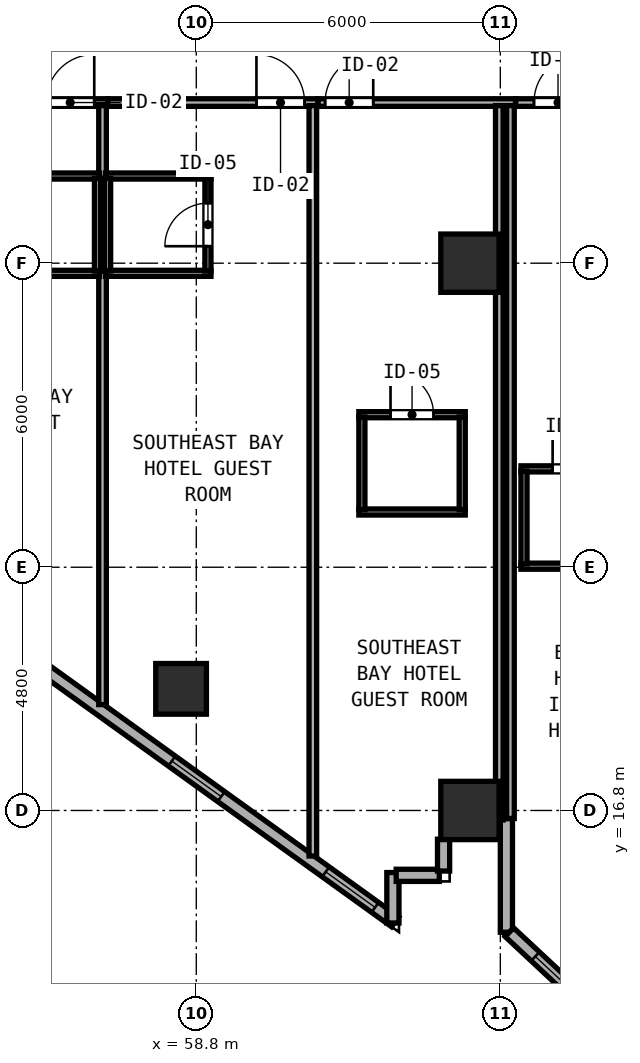
"""IFC4 building model, lengths in metres.
Left out: names, types, materials, properties, quantities, classifications, styles, units other than length and angle.
Written with IfcOpenShell. Run it as: python <this file> out.ifc"""

import sys

from ifc_helpers import new_model, si_unit, direction, frame, frame_2d, origin, origin_2d, place, context, subcontext, project, spatial, rectangle, hollow_rectangle, extrude, element, fill, save


model = new_model("IFC4")
c1 = context("Model", 3, precision=1e-05, world=origin(), true_north=direction((0.0, 1.0)))
c2 = subcontext(c1, "Body", "Model", "MODEL_VIEW")
j1 = project(units=[si_unit("LENGTHUNIT", "METRE"), si_unit("PLANEANGLEUNIT", "RADIAN")], contexts=[c1])
p1 = place(None, origin())
s1 = spatial("IfcSite", under=j1, at=p1, CompositionType="ELEMENT")
p2 = place(p1, origin())
s2 = spatial("IfcBuilding", under=s1, at=p2, CompositionType="ELEMENT")
p3 = place(p2, frame((0.0, 0.0, 81.8)))
s3 = spatial("IfcBuildingStorey", under=s2, at=p3, CompositionType="ELEMENT", Elevation=81.8)
for number, where, z_axis, x_axis in (
    (1, (64.2, 16.8, 0.0), (0.0, 0.0, 1.0), (1.0, 0.0, 0.0)),
    (2, (64.2, 27.6, 0.0), (0.0, 0.0, 1.0), (1.0, 0.0, 0.0)),
):
    element("IfcColumn", number, at=place(p3, frame(where, z_axis=z_axis, x_axis=x_axis)), inside=s3, PredefinedType="COLUMN", context=c2, shape_type="SweptSolid", body=[
        extrude(hollow_rectangle(XDim=1.15, YDim=1.15, WallThickness=0.042, at=origin_2d()), origin(), (0.0, 0.0, 1.0), 3.8),
    ])
p4 = place(p3, frame((58.5, 19.2, 0.0), z_axis=(0.0, 0.0, 1.0), x_axis=(1.0, 0.0, 0.0)))
e3 = element("IfcColumn", 3, at=p4, inside=s3, PredefinedType="COLUMN", context=c2, shape_type="SweptSolid", body=[
    extrude(hollow_rectangle(XDim=1.0, YDim=1.0, WallThickness=0.038, at=origin_2d()), origin(), (0.0, 0.0, 1.0), 3.8),
])
p5 = place(p3, frame((53.367, 21.34, 0.0), z_axis=(0.0, 0.0, 1.0), x_axis=(0.811543176492, -0.58429245476, 0.0)))
e4 = element("IfcWall", 4, at=p5, inside=s3, PredefinedType="SOLIDWALL", context=c2, shape_type="SweptSolid", body=[
    extrude(rectangle(XDim=11.531, YDim=0.24, at=frame_2d((5.765, 0.0))), origin(), (0.0, 0.0, 1.0), 3.097),
])
p6 = place(p5, frame((0.7, 0.0, 0.85)))
e5 = element("IfcOpeningElement", 5, at=p6, cuts=e4, PredefinedType="OPENING", context=c2, shape_type="SweptSolid", body=[
    extrude(rectangle(XDim=1.2, YDim=1.85, at=frame_2d((0.6, 0.925))), frame((0.0, 0.13, 0.0), z_axis=(0.0, -1.0, 0.0), x_axis=(1.0, 0.0, 0.0)), (0.0, 0.0, 1.0), 0.26),
])
p7 = place(p5, frame((6.1, 0.0, 0.85)))
e6 = element("IfcOpeningElement", 6, at=p7, cuts=e4, PredefinedType="OPENING", context=c2, shape_type="SweptSolid", body=[
    extrude(rectangle(XDim=1.2, YDim=1.85, at=frame_2d((0.6, 0.925))), frame((0.0, 0.13, 0.0), z_axis=(0.0, -1.0, 0.0), x_axis=(1.0, 0.0, 0.0)), (0.0, 0.0, 1.0), 0.26),
])
p8 = place(p5, frame((9.842, 0.0, 0.85)))
e7 = element("IfcOpeningElement", 7, at=p8, cuts=e4, PredefinedType="OPENING", context=c2, shape_type="SweptSolid", body=[
    extrude(rectangle(XDim=1.2, YDim=1.85, at=frame_2d((0.6, 0.925))), frame((0.0, 0.13, 0.0), z_axis=(0.0, -1.0, 0.0), x_axis=(1.0, 0.0, 0.0)), (0.0, 0.0, 1.0), 0.26),
])
p9 = place(p3, frame((62.68, 14.579, 0.0), z_axis=(0.0, 0.0, 1.0), x_axis=(0.0, 1.0, 0.0)))
e8 = element("IfcWall", 8, at=p9, inside=s3, PredefinedType="SOLIDWALL", context=c2, shape_type="SweptSolid", body=[
    extrude(rectangle(XDim=0.996, YDim=0.24, at=frame_2d((0.498, 0.0))), origin(), (0.0, 0.0, 1.0), 3.6),
])
p10 = place(p3, frame((62.745, 15.52, 0.0), z_axis=(0.0, 0.0, 1.0), x_axis=(1.0, 0.0, 0.0)))
e9 = element("IfcWall", 9, at=p10, inside=s3, PredefinedType="SOLIDWALL", context=c2, shape_type="SweptSolid", body=[
    extrude(rectangle(XDim=0.85, YDim=0.24, at=frame_2d((0.425, 0.0))), origin(), (0.0, 0.0, 1.0), 3.6),
])
p11 = place(p3, frame((63.68, 15.605, 0.0), z_axis=(0.0, 0.0, 1.0), x_axis=(0.0, 1.0, 0.0)))
e10 = element("IfcWall", 10, at=p11, inside=s3, PredefinedType="SOLIDWALL", context=c2, shape_type="SweptSolid", body=[
    extrude(rectangle(XDim=0.628, YDim=0.24, at=frame_2d((0.314, 0.0))), origin(), (0.0, 0.0, 1.0), 3.6),
])
p12 = place(p3, frame((64.92, 16.64, 0.0), z_axis=(0.0, 0.0, 1.0), x_axis=(0.0, -1.0, 0.0)))
e11 = element("IfcWall", 11, at=p12, inside=s3, PredefinedType="SOLIDWALL", context=c2, shape_type="SweptSolid", body=[
    extrude(rectangle(XDim=2.243, YDim=0.24, at=frame_2d((1.121, 0.0))), origin(), (0.0, 0.0, 1.0), 3.6),
])
p13 = place(p3, frame((64.979, 14.397, 0.0), z_axis=(0.0, 0.0, 1.0), x_axis=(0.731053894258, -0.682319722484, 0.0)))
e12 = element("IfcWall", 12, at=p13, inside=s3, PredefinedType="SOLIDWALL", context=c2, shape_type="SweptSolid", body=[
    extrude(rectangle(XDim=11.818, YDim=0.24, at=frame_2d((5.909, 0.0))), origin(), (0.0, 0.0, 1.0), 3.6),
])
p14 = place(p13, frame((0.7, 0.0, 0.85)))
e13 = element("IfcOpeningElement", 13, at=p14, cuts=e12, PredefinedType="OPENING", context=c2, shape_type="SweptSolid", body=[
    extrude(rectangle(XDim=1.2, YDim=1.85, at=frame_2d((0.6, 0.925))), frame((0.0, 0.13, 0.0), z_axis=(0.0, -1.0, 0.0), x_axis=(1.0, 0.0, 0.0)), (0.0, 0.0, 1.0), 0.26),
])
p15 = place(p13, frame((6.1, 0.0, 0.85)))
e14 = element("IfcOpeningElement", 14, at=p15, cuts=e12, PredefinedType="OPENING", context=c2, shape_type="SweptSolid", body=[
    extrude(rectangle(XDim=1.2, YDim=1.85, at=frame_2d((0.6, 0.925))), frame((0.0, 0.13, 0.0), z_axis=(0.0, -1.0, 0.0), x_axis=(1.0, 0.0, 0.0)), (0.0, 0.0, 1.0), 0.26),
])
p16 = place(p3, frame((73.388, 31.079, 0.0), z_axis=(0.0, 0.0, 1.0), x_axis=(-0.963197271032, 0.268795493036, 0.0)))
e15 = element("IfcWall", 15, at=p16, inside=s3, PredefinedType="SOLIDWALL", context=c2, shape_type="SweptSolid", body=[
    extrude(rectangle(XDim=9.095, YDim=0.24, at=frame_2d((4.548, 0.0))), origin(), (0.0, 0.0, 1.0), 3.6),
])
p17 = place(p16, frame((0.7, 0.0, 0.85)))
e16 = element("IfcOpeningElement", 16, at=p17, cuts=e15, PredefinedType="OPENING", context=c2, shape_type="SweptSolid", body=[
    extrude(rectangle(XDim=1.2, YDim=1.85, at=frame_2d((0.6, 0.925))), frame((0.0, 0.13, 0.0), z_axis=(0.0, -1.0, 0.0), x_axis=(1.0, 0.0, 0.0)), (0.0, 0.0, 1.0), 0.26),
])
p18 = place(p16, frame((6.1, 0.0, 0.85)))
e17 = element("IfcOpeningElement", 17, at=p18, cuts=e15, PredefinedType="OPENING", context=c2, shape_type="SweptSolid", body=[
    extrude(rectangle(XDim=1.2, YDim=1.85, at=frame_2d((0.6, 0.925))), frame((0.0, 0.13, 0.0), z_axis=(0.0, -1.0, 0.0), x_axis=(1.0, 0.0, 0.0)), (0.0, 0.0, 1.0), 0.26),
])
p19 = place(p3, frame((52.882, 30.77, 0.0), z_axis=(0.0, 0.0, 1.0), x_axis=(1.0, 0.0, 0.0)))
e18 = element("IfcWall", 18, at=p19, inside=s3, PredefinedType="PARTITIONING", context=c2, shape_type="SweptSolid", body=[
    extrude(rectangle(XDim=4.168, YDim=0.15, at=frame_2d((2.084, 0.0))), origin(), (0.0, 0.0, 1.0), 3.6),
])
p20 = place(p19, frame((3.905, 0.0, 0.0), z_axis=(0.0, 0.0, 1.0), x_axis=(-1.0, 0.0, 0.0)))
e19 = element("IfcOpeningElement", 19, at=p20, cuts=e18, PredefinedType="OPENING", context=c2, shape_type="SweptSolid", body=[
    extrude(rectangle(XDim=0.95, YDim=2.15, at=frame_2d((0.475, 1.075))), frame((0.0, 0.085, 0.0), z_axis=(0.0, -1.0, 0.0), x_axis=(1.0, 0.0, 0.0)), (0.0, 0.0, 1.0), 0.17),
])
p21 = place(p3, frame((56.95, 18.889, 0.0), z_axis=(0.0, 0.0, 1.0), x_axis=(0.0, 1.0, 0.0)))
e20 = element("IfcWall", 20, at=p21, inside=s3, PredefinedType="PARTITIONING", context=c2, shape_type="SweptSolid", body=[
    extrude(rectangle(XDim=11.821, YDim=0.15, at=frame_2d((5.91, 0.0))), origin(), (0.0, 0.0, 1.0), 3.6),
])
p22 = place(p3, frame((54.81, 29.32, 0.0), z_axis=(0.0, 0.0, 1.0), x_axis=(1.0, 0.0, 0.0)))
e21 = element("IfcWall", 21, at=p22, inside=s3, PredefinedType="PARTITIONING", context=c2, shape_type="SweptSolid", body=[
    extrude(rectangle(XDim=2.08, YDim=0.12, at=frame_2d((1.04, 0.0))), origin(), (0.0, 0.0, 1.0), 3.6),
])
p23 = place(p3, frame((54.81, 27.4, 0.0), z_axis=(0.0, 0.0, 1.0), x_axis=(1.0, 0.0, 0.0)))
e22 = element("IfcWall", 22, at=p23, inside=s3, PredefinedType="PARTITIONING", context=c2, shape_type="SweptSolid", body=[
    extrude(rectangle(XDim=2.08, YDim=0.12, at=frame_2d((1.04, 0.0))), origin(), (0.0, 0.0, 1.0), 3.097),
])
p24 = place(p3, frame((56.85, 27.445, 0.0), z_axis=(0.0, 0.0, 1.0), x_axis=(0.0, 1.0, 0.0)))
e23 = element("IfcWall", 23, at=p24, inside=s3, PredefinedType="PARTITIONING", context=c2, shape_type="SweptSolid", body=[
    extrude(rectangle(XDim=1.83, YDim=0.12, at=frame_2d((0.915, 0.0))), origin(), (0.0, 0.0, 1.0), 3.6),
])
p25 = place(p3, frame((57.052, 30.77, 0.0), z_axis=(0.0, 0.0, 1.0), x_axis=(1.0, 0.0, 0.0)))
e24 = element("IfcWall", 24, at=p25, inside=s3, PredefinedType="PARTITIONING", context=c2, shape_type="SweptSolid", body=[
    extrude(rectangle(XDim=4.148, YDim=0.15, at=frame_2d((2.074, 0.0))), origin(), (0.0, 0.0, 1.0), 3.6),
])
p26 = place(p25, frame((3.885, 0.0, 0.0), z_axis=(0.0, 0.0, 1.0), x_axis=(-1.0, 0.0, 0.0)))
e25 = element("IfcOpeningElement", 25, at=p26, cuts=e24, PredefinedType="OPENING", context=c2, shape_type="SweptSolid", body=[
    extrude(rectangle(XDim=0.95, YDim=2.15, at=frame_2d((0.475, 1.075))), frame((0.0, 0.085, 0.0), z_axis=(0.0, -1.0, 0.0), x_axis=(1.0, 0.0, 0.0)), (0.0, 0.0, 1.0), 0.17),
])
p27 = place(p3, frame((61.1, 15.901, 0.0), z_axis=(0.0, 0.0, 1.0), x_axis=(0.0, 1.0, 0.0)))
e26 = element("IfcWall", 26, at=p27, inside=s3, PredefinedType="PARTITIONING", context=c2, shape_type="SweptSolid", body=[
    extrude(rectangle(XDim=14.809, YDim=0.15, at=frame_2d((7.404, 0.0))), origin(), (0.0, 0.0, 1.0), 3.6),
])
p28 = place(p3, frame((57.01, 29.32, 0.0), z_axis=(0.0, 0.0, 1.0), x_axis=(1.0, 0.0, 0.0)))
e27 = element("IfcWall", 27, at=p28, inside=s3, PredefinedType="PARTITIONING", context=c2, shape_type="SweptSolid", body=[
    extrude(rectangle(XDim=2.08, YDim=0.12, at=frame_2d((1.04, 0.0))), origin(), (0.0, 0.0, 1.0), 3.6),
])
p29 = place(p3, frame((57.01, 27.4, 0.0), z_axis=(0.0, 0.0, 1.0), x_axis=(1.0, 0.0, 0.0)))
e28 = element("IfcWall", 28, at=p29, inside=s3, PredefinedType="PARTITIONING", context=c2, shape_type="SweptSolid", body=[
    extrude(rectangle(XDim=2.08, YDim=0.12, at=frame_2d((1.04, 0.0))), origin(), (0.0, 0.0, 1.0), 3.097),
])
p30 = place(p3, frame((57.05, 27.445, 0.0), z_axis=(0.0, 0.0, 1.0), x_axis=(0.0, 1.0, 0.0)))
e29 = element("IfcWall", 29, at=p30, inside=s3, PredefinedType="PARTITIONING", context=c2, shape_type="SweptSolid", body=[
    extrude(rectangle(XDim=1.83, YDim=0.12, at=frame_2d((0.915, 0.0))), origin(), (0.0, 0.0, 1.0), 3.6),
])
p31 = place(p3, frame((59.03, 27.445, 0.0), z_axis=(0.0, 0.0, 1.0), x_axis=(0.0, 1.0, 0.0)))
e30 = element("IfcWall", 30, at=p31, inside=s3, PredefinedType="PARTITIONING", context=c2, shape_type="SweptSolid", body=[
    extrude(rectangle(XDim=1.83, YDim=0.12, at=frame_2d((0.915, 0.0))), origin(), (0.0, 0.0, 1.0), 3.6),
])
p32 = place(p31, frame((0.49, 0.0, 0.0)))
e31 = element("IfcOpeningElement", 31, at=p32, cuts=e30, PredefinedType="OPENING", context=c2, shape_type="SweptSolid", body=[
    extrude(rectangle(XDim=0.85, YDim=2.1, at=frame_2d((0.425, 1.05))), frame((0.0, 0.07, 0.0), z_axis=(0.0, -1.0, 0.0), x_axis=(1.0, 0.0, 0.0)), (0.0, 0.0, 1.0), 0.14),
])
p33 = place(p3, frame((61.202, 30.77, 0.0), z_axis=(0.0, 0.0, 1.0), x_axis=(1.0, 0.0, 0.0)))
e32 = element("IfcWall", 32, at=p33, inside=s3, PredefinedType="PARTITIONING", context=c2, shape_type="SweptSolid", body=[
    extrude(rectangle(XDim=3.898, YDim=0.15, at=frame_2d((1.949, 0.0))), origin(), (0.0, 0.0, 1.0), 3.6),
])
p34 = place(p33, frame((1.09, 0.0, 0.0), z_axis=(0.0, 0.0, 1.0), x_axis=(-1.0, 0.0, 0.0)))
e33 = element("IfcOpeningElement", 33, at=p34, cuts=e32, PredefinedType="OPENING", context=c2, shape_type="SweptSolid", body=[
    extrude(rectangle(XDim=0.95, YDim=2.15, at=frame_2d((0.475, 1.075))), frame((0.0, 0.085, 0.0), z_axis=(0.0, -1.0, 0.0), x_axis=(1.0, 0.0, 0.0)), (0.0, 0.0, 1.0), 0.17),
])
p35 = place(p3, frame((65.0, 16.642, 0.0), z_axis=(0.0, 0.0, 1.0), x_axis=(0.0, 1.0, 0.0)))
e34 = element("IfcWall", 34, at=p35, inside=s3, PredefinedType="PARTITIONING", context=c2, shape_type="SweptSolid", body=[
    extrude(rectangle(XDim=14.068, YDim=0.15, at=frame_2d((7.034, 0.0))), origin(), (0.0, 0.0, 1.0), 3.6),
])
p36 = place(p3, frame((62.008, 24.61, 0.0), z_axis=(0.0, 0.0, 1.0), x_axis=(1.0, 0.0, 0.0)))
e35 = element("IfcWall", 35, at=p36, inside=s3, PredefinedType="PARTITIONING", context=c2, shape_type="SweptSolid", body=[
    extrude(rectangle(XDim=2.1, YDim=0.12, at=frame_2d((1.05, 0.0))), origin(), (0.0, 0.0, 1.0), 3.6),
])
p37 = place(p36, frame((1.475, 0.0, 0.0), z_axis=(0.0, 0.0, 1.0), x_axis=(-1.0, 0.0, 0.0)))
e36 = element("IfcOpeningElement", 36, at=p37, cuts=e35, PredefinedType="OPENING", context=c2, shape_type="SweptSolid", body=[
    extrude(rectangle(XDim=0.85, YDim=2.1, at=frame_2d((0.425, 1.05))), frame((0.0, 0.07, 0.0), z_axis=(0.0, -1.0, 0.0), x_axis=(1.0, 0.0, 0.0)), (0.0, 0.0, 1.0), 0.14),
])
p38 = place(p3, frame((62.008, 22.69, 0.0), z_axis=(0.0, 0.0, 1.0), x_axis=(1.0, 0.0, 0.0)))
e37 = element("IfcWall", 37, at=p38, inside=s3, PredefinedType="PARTITIONING", context=c2, shape_type="SweptSolid", body=[
    extrude(rectangle(XDim=2.1, YDim=0.12, at=frame_2d((1.05, 0.0))), origin(), (0.0, 0.0, 1.0), 3.6),
])
p39 = place(p3, frame((62.068, 22.735, 0.0), z_axis=(0.0, 0.0, 1.0), x_axis=(0.0, 1.0, 0.0)))
e38 = element("IfcWall", 38, at=p39, inside=s3, PredefinedType="PARTITIONING", context=c2, shape_type="SweptSolid", body=[
    extrude(rectangle(XDim=1.83, YDim=0.12, at=frame_2d((0.915, 0.0))), origin(), (0.0, 0.0, 1.0), 3.6),
])
p40 = place(p3, frame((64.048, 22.735, 0.0), z_axis=(0.0, 0.0, 1.0), x_axis=(0.0, 1.0, 0.0)))
e39 = element("IfcWall", 39, at=p40, inside=s3, PredefinedType="PARTITIONING", context=c2, shape_type="SweptSolid", body=[
    extrude(rectangle(XDim=1.83, YDim=0.12, at=frame_2d((0.915, 0.0))), origin(), (0.0, 0.0, 1.0), 3.097),
])
p41 = place(p3, frame((65.102, 30.77, 0.0), z_axis=(0.0, 0.0, 1.0), x_axis=(1.0, 0.0, 0.0)))
e40 = element("IfcWall", 40, at=p41, inside=s3, PredefinedType="PARTITIONING", context=c2, shape_type="SweptSolid", body=[
    extrude(rectangle(XDim=2.498, YDim=0.15, at=frame_2d((1.249, 0.0))), origin(), (0.0, 0.0, 1.0), 3.6),
])
p42 = place(p41, frame((1.312, 0.0, 0.0), z_axis=(0.0, 0.0, 1.0), x_axis=(-1.0, 0.0, 0.0)))
e41 = element("IfcOpeningElement", 41, at=p42, cuts=e40, PredefinedType="OPENING", context=c2, shape_type="SweptSolid", body=[
    extrude(rectangle(XDim=0.95, YDim=2.15, at=frame_2d((0.475, 1.075))), frame((0.0, 0.085, 0.0), z_axis=(0.0, -1.0, 0.0), x_axis=(1.0, 0.0, 0.0)), (0.0, 0.0, 1.0), 0.17),
])
p43 = place(p3, frame((64.78, 16.612, 0.0), z_axis=(0.0, 0.0, 1.0), x_axis=(0.0, 1.0, 0.0)))
e42 = element("IfcWall", 42, at=p43, inside=s3, PredefinedType="PARTITIONING", context=c2, shape_type="SweptSolid", body=[
    extrude(rectangle(XDim=14.098, YDim=0.15, at=frame_2d((7.049, 0.0))), origin(), (0.0, 0.0, 1.0), 3.6),
])
p44 = place(p3, frame((65.207, 23.541, 0.0), z_axis=(0.0, 0.0, 1.0), x_axis=(1.0, 0.0, 0.0)))
e43 = element("IfcWall", 43, at=p44, inside=s3, PredefinedType="PARTITIONING", context=c2, shape_type="SweptSolid", body=[
    extrude(rectangle(XDim=2.1, YDim=0.12, at=frame_2d((1.05, 0.0))), origin(), (0.0, 0.0, 1.0), 3.6),
])
p45 = place(p44, frame((1.475, 0.0, 0.0), z_axis=(0.0, 0.0, 1.0), x_axis=(-1.0, 0.0, 0.0)))
e44 = element("IfcOpeningElement", 44, at=p45, cuts=e43, PredefinedType="OPENING", context=c2, shape_type="SweptSolid", body=[
    extrude(rectangle(XDim=0.85, YDim=2.1, at=frame_2d((0.425, 1.05))), frame((0.0, 0.07, 0.0), z_axis=(0.0, -1.0, 0.0), x_axis=(1.0, 0.0, 0.0)), (0.0, 0.0, 1.0), 0.14),
])
p46 = place(p3, frame((65.207, 21.621, 0.0), z_axis=(0.0, 0.0, 1.0), x_axis=(1.0, 0.0, 0.0)))
e45 = element("IfcWall", 45, at=p46, inside=s3, PredefinedType="PARTITIONING", context=c2, shape_type="SweptSolid", body=[
    extrude(rectangle(XDim=2.1, YDim=0.12, at=frame_2d((1.05, 0.0))), origin(), (0.0, 0.0, 1.0), 3.6),
])
p47 = place(p3, frame((65.267, 21.666, 0.0), z_axis=(0.0, 0.0, 1.0), x_axis=(0.0, 1.0, 0.0)))
e46 = element("IfcWall", 46, at=p47, inside=s3, PredefinedType="PARTITIONING", context=c2, shape_type="SweptSolid", body=[
    extrude(rectangle(XDim=1.83, YDim=0.12, at=frame_2d((0.915, 0.0))), origin(), (0.0, 0.0, 1.0), 3.6),
])
p48 = place(p7, origin())
e47 = element("IfcWindow", 47, at=p48, inside=s3, PartitioningType="SINGLE_PANEL", PredefinedType="WINDOW", context=c2, shape_type="SweptSolid", body=[
    extrude(rectangle(XDim=1.2, YDim=1.85, at=frame_2d((0.6, 0.925))), frame((0.0, 0.03, 0.0), z_axis=(0.0, -1.0, 0.0), x_axis=(1.0, 0.0, 0.0)), (0.0, 0.0, 1.0), 0.06),
])
fill(e6, e47)
p49 = place(p14, origin())
e48 = element("IfcWindow", 48, at=p49, inside=s3, PartitioningType="SINGLE_PANEL", PredefinedType="WINDOW", context=c2, shape_type="SweptSolid", body=[
    extrude(rectangle(XDim=1.2, YDim=1.85, at=frame_2d((0.6, 0.925))), frame((0.0, 0.03, 0.0), z_axis=(0.0, -1.0, 0.0), x_axis=(1.0, 0.0, 0.0)), (0.0, 0.0, 1.0), 0.06),
])
fill(e13, e48)
p50 = place(p20, origin())
e49 = element("IfcDoor", 49, at=p50, inside=s3, OperationType="SINGLE_SWING_LEFT", PredefinedType="DOOR", context=c2, shape_type="SweptSolid", body=[
    extrude(rectangle(XDim=0.95, YDim=2.15, at=frame_2d((0.475, 1.075))), frame((0.0, 0.025, 0.0), z_axis=(0.0, -1.0, 0.0), x_axis=(1.0, 0.0, 0.0)), (0.0, 0.0, 1.0), 0.05),
])
fill(e19, e49)
p51 = place(p26, origin())
e50 = element("IfcDoor", 50, at=p51, inside=s3, OperationType="SINGLE_SWING_RIGHT", PredefinedType="DOOR", context=c2, shape_type="SweptSolid", body=[
    extrude(rectangle(XDim=0.95, YDim=2.15, at=frame_2d((0.475, 1.075))), frame((0.0, 0.025, 0.0), z_axis=(0.0, -1.0, 0.0), x_axis=(1.0, 0.0, 0.0)), (0.0, 0.0, 1.0), 0.05),
])
fill(e25, e50)
p52 = place(p32, origin())
e51 = element("IfcDoor", 51, at=p52, inside=s3, OperationType="SINGLE_SWING_LEFT", PredefinedType="DOOR", context=c2, shape_type="SweptSolid", body=[
    extrude(rectangle(XDim=0.85, YDim=2.1, at=frame_2d((0.425, 1.05))), frame((0.0, 0.025, 0.0), z_axis=(0.0, -1.0, 0.0), x_axis=(1.0, 0.0, 0.0)), (0.0, 0.0, 1.0), 0.05),
])
fill(e31, e51)
p53 = place(p34, origin())
e52 = element("IfcDoor", 52, at=p53, inside=s3, OperationType="SINGLE_SWING_LEFT", PredefinedType="DOOR", context=c2, shape_type="SweptSolid", body=[
    extrude(rectangle(XDim=0.95, YDim=2.15, at=frame_2d((0.475, 1.075))), frame((0.0, 0.025, 0.0), z_axis=(0.0, -1.0, 0.0), x_axis=(1.0, 0.0, 0.0)), (0.0, 0.0, 1.0), 0.05),
])
fill(e33, e52)
p54 = place(p37, origin())
e53 = element("IfcDoor", 53, at=p54, inside=s3, OperationType="SINGLE_SWING_RIGHT", PredefinedType="DOOR", context=c2, shape_type="SweptSolid", body=[
    extrude(rectangle(XDim=0.85, YDim=2.1, at=frame_2d((0.425, 1.05))), frame((0.0, 0.025, 0.0), z_axis=(0.0, -1.0, 0.0), x_axis=(1.0, 0.0, 0.0)), (0.0, 0.0, 1.0), 0.05),
])
fill(e36, e53)
p55 = place(p42, origin())
e54 = element("IfcDoor", 54, at=p55, inside=s3, OperationType="SINGLE_SWING_LEFT", PredefinedType="DOOR", context=c2, shape_type="SweptSolid", body=[
    extrude(rectangle(XDim=0.95, YDim=2.15, at=frame_2d((0.475, 1.075))), frame((0.0, 0.025, 0.0), z_axis=(0.0, -1.0, 0.0), x_axis=(1.0, 0.0, 0.0)), (0.0, 0.0, 1.0), 0.05),
])
fill(e41, e54)
p56 = place(p45, origin())
e55 = element("IfcDoor", 55, at=p56, inside=s3, OperationType="SINGLE_SWING_RIGHT", PredefinedType="DOOR", context=c2, shape_type="SweptSolid", body=[
    extrude(rectangle(XDim=0.85, YDim=2.1, at=frame_2d((0.425, 1.05))), frame((0.0, 0.025, 0.0), z_axis=(0.0, -1.0, 0.0), x_axis=(1.0, 0.0, 0.0)), (0.0, 0.0, 1.0), 0.05),
])
fill(e44, e55)
p57 = place(p8, origin())
e56 = element("IfcWindow", 56, at=p57, inside=s3, PartitioningType="SINGLE_PANEL", PredefinedType="WINDOW", context=c2, shape_type="SweptSolid", body=[
    extrude(rectangle(XDim=1.2, YDim=1.85, at=frame_2d((0.6, 0.925))), frame((0.0, 0.03, 0.0), z_axis=(0.0, -1.0, 0.0), x_axis=(1.0, 0.0, 0.0)), (0.0, 0.0, 1.0), 0.06),
])
fill(e7, e56)
save(model, sys.argv[1])
